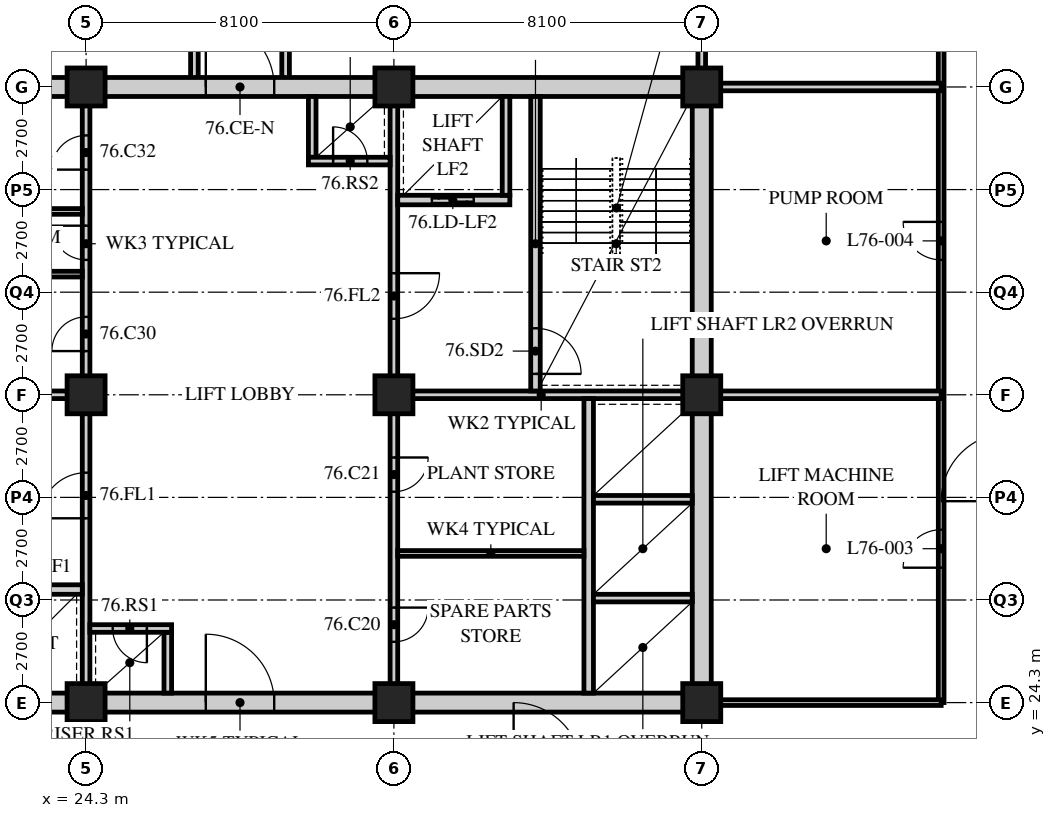
"""IFC4 building model, lengths in metres.
Left out: names, types, materials, properties, quantities, classifications, styles, units other than length and angle.
Written with IfcOpenShell. Run it as: python <this file> out.ifc"""

import sys

from ifc_helpers import new_model, si_unit, direction, frame, frame_2d, origin, origin_2d, place, context, subcontext, project, spatial, rectangle, hollow_rectangle, extrude, element, fill, save


model = new_model("IFC4")
c1 = context("Model", 3, precision=1e-05, world=origin(), true_north=direction((0.0, 1.0)))
c2 = subcontext(c1, "Body", "Model", "MODEL_VIEW")
j1 = project(units=[si_unit("LENGTHUNIT", "METRE"), si_unit("PLANEANGLEUNIT", "RADIAN")], contexts=[c1])
p1 = place(None, origin())
s1 = spatial("IfcSite", under=j1, at=p1, CompositionType="ELEMENT")
p2 = place(p1, origin())
s2 = spatial("IfcBuilding", under=s1, at=p2, CompositionType="ELEMENT")
p3 = place(p2, frame((0.0, 0.0, 298.5)))
s3 = spatial("IfcBuildingStorey", under=s2, at=p3, CompositionType="ELEMENT", Elevation=298.5)
for number, where, z_axis, x_axis in (
    (1, (24.3, 24.3, 0.0), (0.0, 0.0, 1.0), (1.0, 0.0, 0.0)),
    (2, (24.3, 32.4, 0.0), (0.0, 0.0, 1.0), (1.0, 0.0, 0.0)),
    (3, (24.3, 40.5, 0.0), (0.0, 0.0, 1.0), (1.0, 0.0, 0.0)),
    (4, (32.4, 24.3, 0.0), (0.0, 0.0, 1.0), (1.0, 0.0, 0.0)),
    (5, (32.4, 32.4, 0.0), (0.0, 0.0, 1.0), (1.0, 0.0, 0.0)),
    (6, (32.4, 40.5, 0.0), (0.0, 0.0, 1.0), (1.0, 0.0, 0.0)),
    (7, (40.5, 24.3, 0.0), (0.0, 0.0, 1.0), (1.0, 0.0, 0.0)),
    (8, (40.5, 32.4, 0.0), (0.0, 0.0, 1.0), (1.0, 0.0, 0.0)),
    (9, (40.5, 40.5, 0.0), (0.0, 0.0, 1.0), (1.0, 0.0, 0.0)),
):
    element("IfcColumn", number, at=place(p3, frame(where, z_axis=z_axis, x_axis=x_axis)), inside=s3, PredefinedType="COLUMN", context=c2, shape_type="SweptSolid", body=[
        extrude(hollow_rectangle(XDim=1.0, YDim=1.0, WallThickness=0.1, at=origin_2d()), origin(), (0.0, 0.0, 1.0), 5.4),
    ])
p4 = place(p3, frame((46.8, 24.3, 0.0), z_axis=(0.0, 0.0, 1.0), x_axis=(0.0, 1.0, 0.0)))
e10 = element("IfcWall", 10, at=p4, inside=s3, PredefinedType="PARTITIONING", context=c2, shape_type="SweptSolid", body=[
    extrude(rectangle(XDim=30.6, YDim=0.15, at=frame_2d((15.3, 0.0))), origin(), (0.0, 0.0, 1.0), 5.19),
])
p5 = place(p4, frame((3.55, 0.0, 0.0)))
e11 = element("IfcOpeningElement", 11, at=p5, cuts=e10, PredefinedType="OPENING", context=c2, shape_type="SweptSolid", body=[
    extrude(rectangle(XDim=1.0, YDim=2.1, at=frame_2d((0.5, 1.05))), frame((0.0, 0.085, 0.0), z_axis=(0.0, -1.0, 0.0), x_axis=(1.0, 0.0, 0.0)), (0.0, 0.0, 1.0), 0.17),
])
p6 = place(p4, frame((11.65, 0.0, 0.0)))
e12 = element("IfcOpeningElement", 12, at=p6, cuts=e10, PredefinedType="OPENING", context=c2, shape_type="SweptSolid", body=[
    extrude(rectangle(XDim=1.0, YDim=2.1, at=frame_2d((0.5, 1.05))), frame((0.0, 0.085, 0.0), z_axis=(0.0, -1.0, 0.0), x_axis=(1.0, 0.0, 0.0)), (0.0, 0.0, 1.0), 0.17),
])
p7 = place(p3, frame((40.7, 24.3, 0.0), z_axis=(0.0, 0.0, 1.0), x_axis=(1.0, 0.0, 0.0)))
e13 = element("IfcWall", 13, at=p7, inside=s3, PredefinedType="PARTITIONING", context=c2, shape_type="SweptSolid", body=[
    extrude(rectangle(XDim=6.1, YDim=0.15, at=frame_2d((3.05, 0.0))), origin(), (0.0, 0.0, 1.0), 4.428),
])
p8 = place(p3, frame((40.5, 32.4, 0.0), z_axis=(0.0, 0.0, 1.0), x_axis=(1.0, 0.0, 0.0)))
e14 = element("IfcWall", 14, at=p8, inside=s3, PredefinedType="SOLIDWALL", context=c2, shape_type="SweptSolid", body=[
    extrude(rectangle(XDim=6.3, YDim=0.2, at=frame_2d((3.15, 0.0))), origin(), (0.0, 0.0, 1.0), 4.428),
])
p9 = place(p3, frame((40.5, 40.5, 0.0), z_axis=(0.0, 0.0, 1.0), x_axis=(0.0, 1.0, 0.0)))
e15 = element("IfcWall", 15, at=p9, inside=s3, PredefinedType="SOLIDWALL", context=c2, shape_type="SweptSolid", body=[
    extrude(rectangle(XDim=14.4, YDim=0.2, at=frame_2d((7.2, 0.0))), origin(), (0.0, 0.0, 1.0), 4.428),
])
for number, where, z_axis, x_axis in (
    (16, (27.15, 40.5, 0.0), (0.0, 0.0, 1.0), (0.0, 1.0, 0.0)),
    (17, (29.55, 40.5, 0.0), (0.0, 0.0, 1.0), (0.0, 1.0, 0.0)),
):
    element("IfcWall", number, at=place(p3, frame(where, z_axis=z_axis, x_axis=x_axis)), inside=s3, PredefinedType="SOLIDWALL", context=c2, shape_type="SweptSolid", body=[
        extrude(rectangle(XDim=14.4, YDim=0.2, at=frame_2d((7.2, 0.0))), origin(), (0.0, 0.0, 1.0), 5.19),
    ])
p10 = place(p3, frame((40.5, 40.5, 0.0), z_axis=(0.0, 0.0, 1.0), x_axis=(1.0, 0.0, 0.0)))
e18 = element("IfcWall", 18, at=p10, inside=s3, PredefinedType="SOLIDWALL", context=c2, shape_type="SweptSolid", body=[
    extrude(rectangle(XDim=6.3, YDim=0.2, at=frame_2d((3.15, 0.0))), origin(), (0.0, 0.0, 1.0), 4.428),
])
p11 = place(p3, frame((15.95, 24.3, 0.0), z_axis=(0.0, 0.0, 1.0), x_axis=(1.0, 0.0, 0.0)))
e19 = element("IfcWall", 19, at=p11, inside=s3, PredefinedType="SOLIDWALL", context=c2, shape_type="SweptSolid", body=[
    extrude(rectangle(XDim=24.8, YDim=0.5, at=frame_2d((12.4, 0.0))), origin(), (0.0, 0.0, 1.0), 4.428),
])
p12 = place(p11, frame((11.5, 0.0, 0.0)))
e20 = element("IfcOpeningElement", 20, at=p12, cuts=e19, PredefinedType="OPENING", context=c2, shape_type="SweptSolid", body=[
    extrude(rectangle(XDim=1.8, YDim=2.4, at=frame_2d((0.9, 1.2))), frame((0.0, 0.26, 0.0), z_axis=(0.0, -1.0, 0.0), x_axis=(1.0, 0.0, 0.0)), (0.0, 0.0, 1.0), 0.52),
])
p13 = place(p3, frame((15.95, 40.5, 0.0), z_axis=(0.0, 0.0, 1.0), x_axis=(1.0, 0.0, 0.0)))
e21 = element("IfcWall", 21, at=p13, inside=s3, PredefinedType="SOLIDWALL", context=c2, shape_type="SweptSolid", body=[
    extrude(rectangle(XDim=24.8, YDim=0.5, at=frame_2d((12.4, 0.0))), origin(), (0.0, 0.0, 1.0), 4.428),
])
p14 = place(p13, frame((11.5, 0.0, 0.0)))
e22 = element("IfcOpeningElement", 22, at=p14, cuts=e21, PredefinedType="OPENING", context=c2, shape_type="SweptSolid", body=[
    extrude(rectangle(XDim=1.8, YDim=2.4, at=frame_2d((0.9, 1.2))), frame((0.0, 0.26, 0.0), z_axis=(0.0, -1.0, 0.0), x_axis=(1.0, 0.0, 0.0)), (0.0, 0.0, 1.0), 0.52),
])
p15 = place(p3, frame((40.5, 24.55, 0.0), z_axis=(0.0, 0.0, 1.0), x_axis=(0.0, 1.0, 0.0)))
e23 = element("IfcWall", 23, at=p15, inside=s3, PredefinedType="SOLIDWALL", context=c2, shape_type="SweptSolid", body=[
    extrude(rectangle(XDim=15.7, YDim=0.5, at=frame_2d((7.85, 0.0))), origin(), (0.0, 0.0, 1.0), 4.428),
])
p16 = place(p3, frame((16.45, 32.4, 0.0), z_axis=(0.0, 0.0, 1.0), x_axis=(1.0, 0.0, 0.0)))
e24 = element("IfcWall", 24, at=p16, inside=s3, PredefinedType="SOLIDWALL", context=c2, shape_type="SweptSolid", body=[
    extrude(rectangle(XDim=7.95, YDim=0.2, at=frame_2d((3.975, 0.0))), origin(), (0.0, 0.0, 1.0), 4.428),
])
p17 = place(p3, frame((24.3, 24.55, 0.0), z_axis=(0.0, 0.0, 1.0), x_axis=(0.0, 1.0, 0.0)))
e25 = element("IfcWall", 25, at=p17, inside=s3, PredefinedType="SOLIDWALL", context=c2, shape_type="SweptSolid", body=[
    extrude(rectangle(XDim=7.75, YDim=0.2, at=frame_2d((3.875, 0.0))), origin(), (0.0, 0.0, 1.0), 4.428),
])
p18 = place(p17, frame((4.6, 0.0, 0.0)))
e26 = element("IfcOpeningElement", 26, at=p18, cuts=e25, PredefinedType="OPENING", context=c2, shape_type="SweptSolid", body=[
    extrude(rectangle(XDim=1.2, YDim=2.1, at=frame_2d((0.6, 1.05))), frame((0.0, 0.11, 0.0), z_axis=(0.0, -1.0, 0.0), x_axis=(1.0, 0.0, 0.0)), (0.0, 0.0, 1.0), 0.22),
])
p19 = place(p3, frame((21.25, 27.275, 0.0), z_axis=(0.0, 0.0, 1.0), x_axis=(1.0, 0.0, 0.0)))
e27 = element("IfcWall", 27, at=p19, inside=s3, PredefinedType="SOLIDWALL", context=c2, shape_type="SweptSolid", body=[
    extrude(rectangle(XDim=2.95, YDim=0.25, at=frame_2d((1.475, 0.0))), origin(), (0.0, 0.0, 1.0), 5.19),
])
p20 = place(p19, frame((0.95, 0.0, 0.0)))
e28 = element("IfcOpeningElement", 28, at=p20, cuts=e27, PredefinedType="OPENING", context=c2, shape_type="SweptSolid", body=[
    extrude(rectangle(XDim=1.1, YDim=2.4, at=frame_2d((0.55, 1.2))), frame((0.0, 0.135, 0.0), z_axis=(0.0, -1.0, 0.0), x_axis=(1.0, 0.0, 0.0)), (0.0, 0.0, 1.0), 0.27),
])
p21 = place(p3, frame((26.45, 24.55, 0.0), z_axis=(0.0, 0.0, 1.0), x_axis=(0.0, 1.0, 0.0)))
e29 = element("IfcWall", 29, at=p21, inside=s3, PredefinedType="SOLIDWALL", context=c2, shape_type="SweptSolid", body=[
    extrude(rectangle(XDim=1.6, YDim=0.2, at=frame_2d((0.8, 0.0))), origin(), (0.0, 0.0, 1.0), 5.19),
])
p22 = place(p3, frame((24.4, 26.25, 0.0), z_axis=(0.0, 0.0, 1.0), x_axis=(1.0, 0.0, 0.0)))
e30 = element("IfcWall", 30, at=p22, inside=s3, PredefinedType="SOLIDWALL", context=c2, shape_type="SweptSolid", body=[
    extrude(rectangle(XDim=2.15, YDim=0.2, at=frame_2d((1.075, 0.0))), origin(), (0.0, 0.0, 1.0), 5.19),
])
p23 = place(p22, frame((0.6, 0.0, 0.0)))
e31 = element("IfcOpeningElement", 31, at=p23, cuts=e30, PredefinedType="OPENING", context=c2, shape_type="SweptSolid", body=[
    extrude(rectangle(XDim=0.9, YDim=2.1, at=frame_2d((0.45, 1.05))), frame((0.0, 0.11, 0.0), z_axis=(0.0, -1.0, 0.0), x_axis=(1.0, 0.0, 0.0)), (0.0, 0.0, 1.0), 0.22),
])
p24 = place(p3, frame((32.3, 32.4, 0.0), z_axis=(0.0, 0.0, 1.0), x_axis=(1.0, 0.0, 0.0)))
e32 = element("IfcWall", 32, at=p24, inside=s3, PredefinedType="SOLIDWALL", context=c2, shape_type="SweptSolid", body=[
    extrude(rectangle(XDim=7.95, YDim=0.2, at=frame_2d((3.975, 0.0))), origin(), (0.0, 0.0, 1.0), 4.428),
])
p25 = place(p3, frame((32.4, 32.5, 0.0), z_axis=(0.0, 0.0, 1.0), x_axis=(0.0, 1.0, 0.0)))
e33 = element("IfcWall", 33, at=p25, inside=s3, PredefinedType="SOLIDWALL", context=c2, shape_type="SweptSolid", body=[
    extrude(rectangle(XDim=7.75, YDim=0.2, at=frame_2d((3.875, 0.0))), origin(), (0.0, 0.0, 1.0), 4.428),
])
p26 = place(p25, frame((1.9, 0.0, 0.0)))
e34 = element("IfcOpeningElement", 34, at=p26, cuts=e33, PredefinedType="OPENING", context=c2, shape_type="SweptSolid", body=[
    extrude(rectangle(XDim=1.2, YDim=2.1, at=frame_2d((0.6, 1.05))), frame((0.0, 0.11, 0.0), z_axis=(0.0, -1.0, 0.0), x_axis=(1.0, 0.0, 0.0)), (0.0, 0.0, 1.0), 0.22),
])
p27 = place(p3, frame((37.525, 24.55, 0.0), z_axis=(0.0, 0.0, 1.0), x_axis=(0.0, 1.0, 0.0)))
e35 = element("IfcWall", 35, at=p27, inside=s3, PredefinedType="SOLIDWALL", context=c2, shape_type="SweptSolid", body=[
    extrude(rectangle(XDim=7.75, YDim=0.25, at=frame_2d((3.875, 0.0))), origin(), (0.0, 0.0, 1.0), 5.19),
])
for number, where, z_axis, x_axis in (
    (36, (37.65, 27.05, 0.0), (0.0, 0.0, 1.0), (1.0, 0.0, 0.0)),
    (37, (37.65, 29.65, 0.0), (0.0, 0.0, 1.0), (1.0, 0.0, 0.0)),
):
    element("IfcWall", number, at=place(p3, frame(where, z_axis=z_axis, x_axis=x_axis)), inside=s3, PredefinedType="SOLIDWALL", context=c2, shape_type="SweptSolid", body=[
        extrude(rectangle(XDim=2.6, YDim=0.2, at=frame_2d((1.3, 0.0))), origin(), (0.0, 0.0, 1.0), 5.19),
    ])
p28 = place(p3, frame((36.125, 32.5, 0.0), z_axis=(0.0, 0.0, 1.0), x_axis=(0.0, 1.0, 0.0)))
e38 = element("IfcWall", 38, at=p28, inside=s3, PredefinedType="SOLIDWALL", context=c2, shape_type="SweptSolid", body=[
    extrude(rectangle(XDim=7.75, YDim=0.25, at=frame_2d((3.875, 0.0))), origin(), (0.0, 0.0, 1.0), 5.19),
])
p29 = place(p28, frame((0.45, 0.0, 0.0)))
e39 = element("IfcOpeningElement", 39, at=p29, cuts=e38, PredefinedType="OPENING", context=c2, shape_type="SweptSolid", body=[
    extrude(rectangle(XDim=1.2, YDim=2.1, at=frame_2d((0.6, 1.05))), frame((0.0, 0.135, 0.0), z_axis=(0.0, -1.0, 0.0), x_axis=(1.0, 0.0, 0.0)), (0.0, 0.0, 1.0), 0.27),
])
p30 = place(p3, frame((32.5, 37.525, 0.0), z_axis=(0.0, 0.0, 1.0), x_axis=(1.0, 0.0, 0.0)))
e40 = element("IfcWall", 40, at=p30, inside=s3, PredefinedType="SOLIDWALL", context=c2, shape_type="SweptSolid", body=[
    extrude(rectangle(XDim=2.95, YDim=0.25, at=frame_2d((1.475, 0.0))), origin(), (0.0, 0.0, 1.0), 5.19),
])
p31 = place(p30, frame((0.9, 0.0, 0.0)))
e41 = element("IfcOpeningElement", 41, at=p31, cuts=e40, PredefinedType="OPENING", context=c2, shape_type="SweptSolid", body=[
    extrude(rectangle(XDim=1.1, YDim=2.4, at=frame_2d((0.55, 1.2))), frame((0.0, 0.135, 0.0), z_axis=(0.0, -1.0, 0.0), x_axis=(1.0, 0.0, 0.0)), (0.0, 0.0, 1.0), 0.27),
])
p32 = place(p3, frame((35.35, 37.65, 0.0), z_axis=(0.0, 0.0, 1.0), x_axis=(0.0, 1.0, 0.0)))
e42 = element("IfcWall", 42, at=p32, inside=s3, PredefinedType="SOLIDWALL", context=c2, shape_type="SweptSolid", body=[
    extrude(rectangle(XDim=2.6, YDim=0.2, at=frame_2d((1.3, 0.0))), origin(), (0.0, 0.0, 1.0), 5.19),
])
p33 = place(p3, frame((30.25, 38.65, 0.0), z_axis=(0.0, 0.0, 1.0), x_axis=(0.0, 1.0, 0.0)))
e43 = element("IfcWall", 43, at=p33, inside=s3, PredefinedType="SOLIDWALL", context=c2, shape_type="SweptSolid", body=[
    extrude(rectangle(XDim=1.6, YDim=0.2, at=frame_2d((0.8, 0.0))), origin(), (0.0, 0.0, 1.0), 5.19),
])
p34 = place(p3, frame((30.15, 38.55, 0.0), z_axis=(0.0, 0.0, 1.0), x_axis=(1.0, 0.0, 0.0)))
e44 = element("IfcWall", 44, at=p34, inside=s3, PredefinedType="SOLIDWALL", context=c2, shape_type="SweptSolid", body=[
    extrude(rectangle(XDim=2.15, YDim=0.2, at=frame_2d((1.075, 0.0))), origin(), (0.0, 0.0, 1.0), 5.19),
])
p35 = place(p34, frame((0.65, 0.0, 0.0)))
e45 = element("IfcOpeningElement", 45, at=p35, cuts=e44, PredefinedType="OPENING", context=c2, shape_type="SweptSolid", body=[
    extrude(rectangle(XDim=0.9, YDim=2.1, at=frame_2d((0.45, 1.05))), frame((0.0, 0.11, 0.0), z_axis=(0.0, -1.0, 0.0), x_axis=(1.0, 0.0, 0.0)), (0.0, 0.0, 1.0), 0.22),
])
p36 = place(p3, frame((24.3, 32.5, 0.0), z_axis=(0.0, 0.0, 1.0), x_axis=(0.0, 1.0, 0.0)))
e46 = element("IfcWall", 46, at=p36, inside=s3, PredefinedType="PARTITIONING", context=c2, shape_type="SweptSolid", body=[
    extrude(rectangle(XDim=7.75, YDim=0.2, at=frame_2d((3.875, 0.0))), origin(), (0.0, 0.0, 1.0), 4.428),
])
p37 = place(p36, frame((1.05, 0.0, 0.0)))
e47 = element("IfcOpeningElement", 47, at=p37, cuts=e46, PredefinedType="OPENING", context=c2, shape_type="SweptSolid", body=[
    extrude(rectangle(XDim=0.9, YDim=2.1, at=frame_2d((0.45, 1.05))), frame((0.0, 0.11, 0.0), z_axis=(0.0, -1.0, 0.0), x_axis=(1.0, 0.0, 0.0)), (0.0, 0.0, 1.0), 0.22),
])
p38 = place(p36, frame((3.45, 0.0, 0.0)))
e48 = element("IfcOpeningElement", 48, at=p38, cuts=e46, PredefinedType="OPENING", context=c2, shape_type="SweptSolid", body=[
    extrude(rectangle(XDim=0.9, YDim=2.1, at=frame_2d((0.45, 1.05))), frame((0.0, 0.11, 0.0), z_axis=(0.0, -1.0, 0.0), x_axis=(1.0, 0.0, 0.0)), (0.0, 0.0, 1.0), 0.22),
])
p39 = place(p36, frame((5.825, 0.0, 0.0)))
e49 = element("IfcOpeningElement", 49, at=p39, cuts=e46, PredefinedType="OPENING", context=c2, shape_type="SweptSolid", body=[
    extrude(rectangle(XDim=0.9, YDim=2.1, at=frame_2d((0.45, 1.05))), frame((0.0, 0.11, 0.0), z_axis=(0.0, -1.0, 0.0), x_axis=(1.0, 0.0, 0.0)), (0.0, 0.0, 1.0), 0.22),
])
for number, where, z_axis, x_axis in (
    (50, (21.05, 35.575, 0.0), (0.0, 0.0, 1.0), (1.0, 0.0, 0.0)),
    (51, (21.05, 37.225, 0.0), (0.0, 0.0, 1.0), (1.0, 0.0, 0.0)),
):
    element("IfcWall", number, at=place(p3, frame(where, z_axis=z_axis, x_axis=x_axis)), inside=s3, PredefinedType="PARTITIONING", context=c2, shape_type="SweptSolid", body=[
        extrude(rectangle(XDim=3.15, YDim=0.15, at=frame_2d((1.575, 0.0))), origin(), (0.0, 0.0, 1.0), 5.19),
    ])
p40 = place(p3, frame((32.4, 24.55, 0.0), z_axis=(0.0, 0.0, 1.0), x_axis=(0.0, 1.0, 0.0)))
e52 = element("IfcWall", 52, at=p40, inside=s3, PredefinedType="PARTITIONING", context=c2, shape_type="SweptSolid", body=[
    extrude(rectangle(XDim=7.75, YDim=0.2, at=frame_2d((3.875, 0.0))), origin(), (0.0, 0.0, 1.0), 4.428),
])
p41 = place(p40, frame((1.35, 0.0, 0.0)))
e53 = element("IfcOpeningElement", 53, at=p41, cuts=e52, PredefinedType="OPENING", context=c2, shape_type="SweptSolid", body=[
    extrude(rectangle(XDim=0.9, YDim=2.1, at=frame_2d((0.45, 1.05))), frame((0.0, 0.11, 0.0), z_axis=(0.0, -1.0, 0.0), x_axis=(1.0, 0.0, 0.0)), (0.0, 0.0, 1.0), 0.22),
])
p42 = place(p40, frame((5.3, 0.0, 0.0)))
e54 = element("IfcOpeningElement", 54, at=p42, cuts=e52, PredefinedType="OPENING", context=c2, shape_type="SweptSolid", body=[
    extrude(rectangle(XDim=0.9, YDim=2.1, at=frame_2d((0.45, 1.05))), frame((0.0, 0.11, 0.0), z_axis=(0.0, -1.0, 0.0), x_axis=(1.0, 0.0, 0.0)), (0.0, 0.0, 1.0), 0.22),
])
p43 = place(p3, frame((32.5, 28.225, 0.0), z_axis=(0.0, 0.0, 1.0), x_axis=(1.0, 0.0, 0.0)))
e55 = element("IfcWall", 55, at=p43, inside=s3, PredefinedType="PARTITIONING", context=c2, shape_type="SweptSolid", body=[
    extrude(rectangle(XDim=4.9, YDim=0.15, at=frame_2d((2.45, 0.0))), origin(), (0.0, 0.0, 1.0), 5.19),
])
p44 = place(p5, origin())
e56 = element("IfcDoor", 56, at=p44, inside=s3, OperationType="SINGLE_SWING_LEFT", PredefinedType="DOOR", context=c2, shape_type="SweptSolid", body=[
    extrude(rectangle(XDim=1.0, YDim=2.1, at=frame_2d((0.5, 1.05))), frame((0.0, 0.025, 0.0), z_axis=(0.0, -1.0, 0.0), x_axis=(1.0, 0.0, 0.0)), (0.0, 0.0, 1.0), 0.05),
])
fill(e11, e56)
p45 = place(p6, origin())
e57 = element("IfcDoor", 57, at=p45, inside=s3, OperationType="SINGLE_SWING_RIGHT", PredefinedType="DOOR", context=c2, shape_type="SweptSolid", body=[
    extrude(rectangle(XDim=1.0, YDim=2.1, at=frame_2d((0.5, 1.05))), frame((0.0, 0.025, 0.0), z_axis=(0.0, -1.0, 0.0), x_axis=(1.0, 0.0, 0.0)), (0.0, 0.0, 1.0), 0.05),
])
fill(e12, e57)
p46 = place(p37, origin())
e58 = element("IfcDoor", 58, at=p46, inside=s3, OperationType="SINGLE_SWING_LEFT", PredefinedType="DOOR", context=c2, shape_type="SweptSolid", body=[
    extrude(rectangle(XDim=0.9, YDim=2.1, at=frame_2d((0.45, 1.05))), frame((0.0, 0.025, 0.0), z_axis=(0.0, -1.0, 0.0), x_axis=(1.0, 0.0, 0.0)), (0.0, 0.0, 1.0), 0.05),
])
fill(e47, e58)
p47 = place(p38, origin())
e59 = element("IfcDoor", 59, at=p47, inside=s3, OperationType="SINGLE_SWING_RIGHT", PredefinedType="DOOR", context=c2, shape_type="SweptSolid", body=[
    extrude(rectangle(XDim=0.9, YDim=2.1, at=frame_2d((0.45, 1.05))), frame((0.0, 0.025, 0.0), z_axis=(0.0, -1.0, 0.0), x_axis=(1.0, 0.0, 0.0)), (0.0, 0.0, 1.0), 0.05),
])
fill(e48, e59)
p48 = place(p39, origin())
e60 = element("IfcDoor", 60, at=p48, inside=s3, OperationType="SINGLE_SWING_LEFT", PredefinedType="DOOR", context=c2, shape_type="SweptSolid", body=[
    extrude(rectangle(XDim=0.9, YDim=2.1, at=frame_2d((0.45, 1.05))), frame((0.0, 0.025, 0.0), z_axis=(0.0, -1.0, 0.0), x_axis=(1.0, 0.0, 0.0)), (0.0, 0.0, 1.0), 0.05),
])
fill(e49, e60)
p49 = place(p41, origin())
e61 = element("IfcDoor", 61, at=p49, inside=s3, OperationType="SINGLE_SWING_LEFT", PredefinedType="DOOR", context=c2, shape_type="SweptSolid", body=[
    extrude(rectangle(XDim=0.9, YDim=2.1, at=frame_2d((0.45, 1.05))), frame((0.0, 0.025, 0.0), z_axis=(0.0, -1.0, 0.0), x_axis=(1.0, 0.0, 0.0)), (0.0, 0.0, 1.0), 0.05),
])
fill(e53, e61)
p50 = place(p42, origin())
e62 = element("IfcDoor", 62, at=p50, inside=s3, OperationType="SINGLE_SWING_LEFT", PredefinedType="DOOR", context=c2, shape_type="SweptSolid", body=[
    extrude(rectangle(XDim=0.9, YDim=2.1, at=frame_2d((0.45, 1.05))), frame((0.0, 0.025, 0.0), z_axis=(0.0, -1.0, 0.0), x_axis=(1.0, 0.0, 0.0)), (0.0, 0.0, 1.0), 0.05),
])
fill(e54, e62)
p51 = place(p18, origin())
e63 = element("IfcDoor", 63, at=p51, inside=s3, OperationType="SINGLE_SWING_LEFT", PredefinedType="DOOR", context=c2, shape_type="SweptSolid", body=[
    extrude(rectangle(XDim=1.2, YDim=2.1, at=frame_2d((0.6, 1.05))), frame((0.0, 0.025, 0.0), z_axis=(0.0, -1.0, 0.0), x_axis=(1.0, 0.0, 0.0)), (0.0, 0.0, 1.0), 0.05),
])
fill(e26, e63)
p52 = place(p23, origin())
e64 = element("IfcDoor", 64, at=p52, inside=s3, OperationType="SINGLE_SWING_LEFT", PredefinedType="DOOR", context=c2, shape_type="SweptSolid", body=[
    extrude(rectangle(XDim=0.9, YDim=2.1, at=frame_2d((0.45, 1.05))), frame((0.0, 0.025, 0.0), z_axis=(0.0, -1.0, 0.0), x_axis=(1.0, 0.0, 0.0)), (0.0, 0.0, 1.0), 0.05),
])
fill(e31, e64)
p53 = place(p29, origin())
e65 = element("IfcDoor", 65, at=p53, inside=s3, OperationType="SINGLE_SWING_RIGHT", PredefinedType="DOOR", context=c2, shape_type="SweptSolid", body=[
    extrude(rectangle(XDim=1.2, YDim=2.1, at=frame_2d((0.6, 1.05))), frame((0.0, 0.025, 0.0), z_axis=(0.0, -1.0, 0.0), x_axis=(1.0, 0.0, 0.0)), (0.0, 0.0, 1.0), 0.05),
])
fill(e39, e65)
p54 = place(p26, origin())
e66 = element("IfcDoor", 66, at=p54, inside=s3, OperationType="SINGLE_SWING_LEFT", PredefinedType="DOOR", context=c2, shape_type="SweptSolid", body=[
    extrude(rectangle(XDim=1.2, YDim=2.1, at=frame_2d((0.6, 1.05))), frame((0.0, 0.025, 0.0), z_axis=(0.0, -1.0, 0.0), x_axis=(1.0, 0.0, 0.0)), (0.0, 0.0, 1.0), 0.05),
])
fill(e34, e66)
p55 = place(p35, origin())
e67 = element("IfcDoor", 67, at=p55, inside=s3, OperationType="SINGLE_SWING_LEFT", PredefinedType="DOOR", context=c2, shape_type="SweptSolid", body=[
    extrude(rectangle(XDim=0.9, YDim=2.1, at=frame_2d((0.45, 1.05))), frame((0.0, 0.025, 0.0), z_axis=(0.0, -1.0, 0.0), x_axis=(1.0, 0.0, 0.0)), (0.0, 0.0, 1.0), 0.05),
])
fill(e45, e67)
p56 = place(p31, origin())
e68 = element("IfcDoor", 68, at=p56, inside=s3, OperationType="DOUBLE_DOOR_SLIDING", PredefinedType="DOOR", context=c2, shape_type="SweptSolid", body=[
    extrude(rectangle(XDim=1.1, YDim=2.4, at=frame_2d((0.55, 1.2))), frame((0.0, 0.025, 0.0), z_axis=(0.0, -1.0, 0.0), x_axis=(1.0, 0.0, 0.0)), (0.0, 0.0, 1.0), 0.05),
])
fill(e41, e68)
p57 = place(p12, origin())
e69 = element("IfcDoor", 69, at=p57, inside=s3, OperationType="DOUBLE_DOOR_SINGLE_SWING", PredefinedType="DOOR", context=c2, shape_type="SweptSolid", body=[
    extrude(rectangle(XDim=1.8, YDim=2.4, at=frame_2d((0.9, 1.2))), frame((0.0, 0.025, 0.0), z_axis=(0.0, -1.0, 0.0), x_axis=(1.0, 0.0, 0.0)), (0.0, 0.0, 1.0), 0.05),
])
fill(e20, e69)
p58 = place(p14, origin())
e70 = element("IfcDoor", 70, at=p58, inside=s3, OperationType="DOUBLE_DOOR_SINGLE_SWING", PredefinedType="DOOR", context=c2, shape_type="SweptSolid", body=[
    extrude(rectangle(XDim=1.8, YDim=2.4, at=frame_2d((0.9, 1.2))), frame((0.0, 0.025, 0.0), z_axis=(0.0, -1.0, 0.0), x_axis=(1.0, 0.0, 0.0)), (0.0, 0.0, 1.0), 0.05),
])
fill(e22, e70)
save(model, sys.argv[1])
